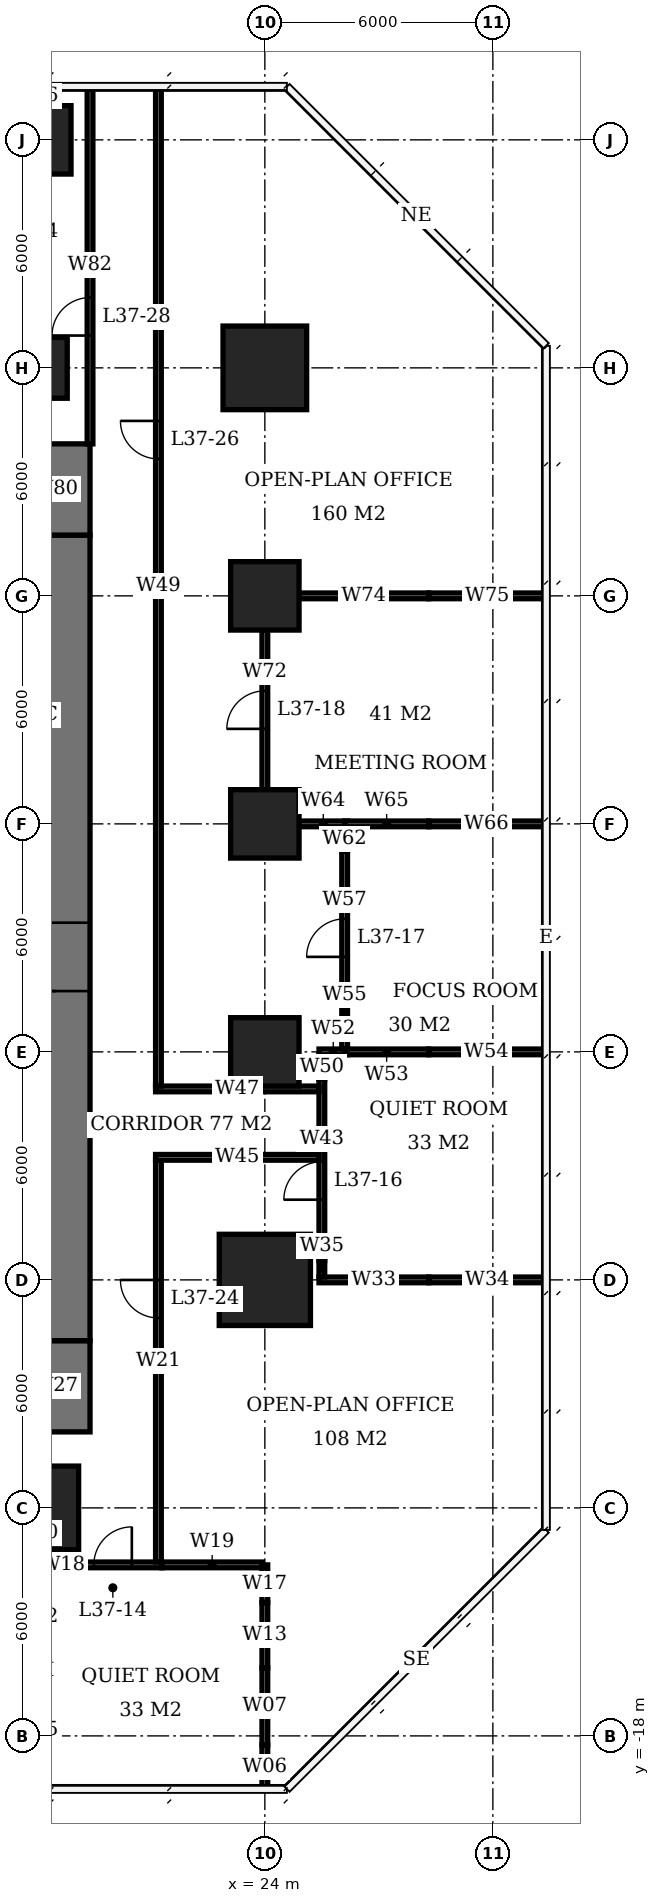
"""IFC4 building model, lengths in metres.
Left out: names, types, materials, properties, quantities, classifications, styles, units other than length and angle.
Written with IfcOpenShell. Run it as: python <this file> out.ifc"""

import sys

from ifc_helpers import new_model, si_unit, direction, frame, frame_2d, origin, origin_2d, place, context, subcontext, project, spatial, rectangle, extrude, element, fill, save


model = new_model("IFC4")
c1 = context("Model", 3, precision=1e-05, world=origin(), true_north=direction((0.0, 1.0)))
c2 = subcontext(c1, "Body", "Model", "MODEL_VIEW")
j1 = project(units=[si_unit("LENGTHUNIT", "METRE"), si_unit("PLANEANGLEUNIT", "RADIAN")], contexts=[c1])
p1 = place(None, origin())
s1 = spatial("IfcSite", under=j1, at=p1, CompositionType="ELEMENT")
p2 = place(p1, origin())
s2 = spatial("IfcBuilding", under=s1, at=p2, CompositionType="ELEMENT")
p3 = place(p2, frame((0.0, 0.0, 152.3)))
s3 = spatial("IfcBuildingStorey", under=s2, at=p3, CompositionType="ELEMENT", Elevation=152.3)
p4 = place(p3, frame((18.0, -12.0, 0.0), z_axis=(0.0, 0.0, 1.0), x_axis=(1.0, 0.0, 0.0)))
e1 = element("IfcColumn", 1, at=p4, inside=s3, PredefinedType="COLUMN", context=c2, shape_type="SweptSolid", body=[
    extrude(rectangle(XDim=2.2, YDim=2.2, at=origin_2d()), origin(), (0.0, 0.0, 1.0), 3.9),
])
p5 = place(p3, frame((18.0, 18.0, 0.0), z_axis=(0.0, 0.0, 1.0), x_axis=(1.0, 0.0, 0.0)))
e2 = element("IfcColumn", 2, at=p5, inside=s3, PredefinedType="COLUMN", context=c2, shape_type="SweptSolid", body=[
    extrude(rectangle(XDim=1.6, YDim=1.6, at=origin_2d()), origin(), (0.0, 0.0, 1.0), 3.9),
])
p6 = place(p3, frame((18.0, 24.0, 0.0), z_axis=(0.0, 0.0, 1.0), x_axis=(1.0, 0.0, 0.0)))
e3 = element("IfcColumn", 3, at=p6, inside=s3, PredefinedType="COLUMN", context=c2, shape_type="SweptSolid", body=[
    extrude(rectangle(XDim=1.8, YDim=1.8, at=origin_2d()), origin(), (0.0, 0.0, 1.0), 3.9),
])
p7 = place(p3, frame((24.0, -6.0, 0.0), z_axis=(0.0, 0.0, 1.0), x_axis=(1.0, 0.0, 0.0)))
e4 = element("IfcColumn", 4, at=p7, inside=s3, PredefinedType="COLUMN", context=c2, shape_type="SweptSolid", body=[
    extrude(rectangle(XDim=2.4, YDim=2.4, at=origin_2d()), origin(), (0.0, 0.0, 1.0), 3.9),
])
for number, where, z_axis, x_axis in (
    (5, (24.0, 0.0, 0.0), (0.0, 0.0, 1.0), (1.0, 0.0, 0.0)),
    (6, (24.0, 6.0, 0.0), (0.0, 0.0, 1.0), (1.0, 0.0, 0.0)),
    (7, (24.0, 12.0, 0.0), (0.0, 0.0, 1.0), (1.0, 0.0, 0.0)),
):
    element("IfcColumn", number, at=place(p3, frame(where, z_axis=z_axis, x_axis=x_axis)), inside=s3, PredefinedType="COLUMN", context=c2, shape_type="SweptSolid", body=[
        extrude(rectangle(XDim=1.8, YDim=1.8, at=origin_2d()), origin(), (0.0, 0.0, 1.0), 3.9),
    ])
p8 = place(p3, frame((24.0, 18.0, 0.0), z_axis=(0.0, 0.0, 1.0), x_axis=(1.0, 0.0, 0.0)))
e8 = element("IfcColumn", 8, at=p8, inside=s3, PredefinedType="COLUMN", context=c2, shape_type="SweptSolid", body=[
    extrude(rectangle(XDim=2.2, YDim=2.2, at=origin_2d()), origin(), (0.0, 0.0, 1.0), 3.9),
])
p9 = place(p3, frame((18.5, -7.6, 0.0), z_axis=(0.0, 0.0, 1.0), x_axis=(0.0, 1.0, 0.0)))
e9 = element("IfcWall", 9, at=p9, inside=s3, PredefinedType="SHEAR", context=c2, shape_type="SweptSolid", body=[
    extrude(rectangle(XDim=21.2, YDim=1.8, at=frame_2d((10.6, 0.0))), origin(), (0.0, 0.0, 1.0), 3.9),
])
p10 = place(p9, frame((9.2, 0.0, 0.0)))
e10 = element("IfcOpeningElement", 10, at=p10, cuts=e9, PredefinedType="OPENING", context=c2, shape_type="SweptSolid", body=[
    extrude(rectangle(XDim=1.8, YDim=2.4, at=frame_2d((0.9, 1.2))), frame((0.0, 0.91, 0.0), z_axis=(0.0, -1.0, 0.0), x_axis=(1.0, 0.0, 0.0)), (0.0, 0.0, 1.0), 1.82),
])
for number, where, z_axis, x_axis in (
    (11, (18.5, -10.0, 0.0), (0.0, 0.0, 1.0), (0.0, 1.0, 0.0)),
    (12, (18.5, 13.6, 0.0), (0.0, 0.0, 1.0), (0.0, 1.0, 0.0)),
):
    element("IfcWall", number, at=place(p3, frame(where, z_axis=z_axis, x_axis=x_axis)), inside=s3, PredefinedType="SHEAR", context=c2, shape_type="SweptSolid", body=[
        extrude(rectangle(XDim=2.4, YDim=1.8, at=frame_2d((1.2, 0.0))), origin(), (0.0, 0.0, 1.0), 3.9),
    ])
p11 = place(p3, frame((18.075, -13.5, 0.0), z_axis=(0.0, 0.0, 1.0), x_axis=(1.0, 0.0, 0.0)))
e13 = element("IfcWall", 13, at=p11, inside=s3, PredefinedType="PARTITIONING", context=c2, shape_type="SweptSolid", body=[
    extrude(rectangle(XDim=3.217, YDim=0.15, at=frame_2d((1.608, 0.0))), origin(), (0.0, 0.0, 1.0), 2.65),
])
p12 = place(p11, frame((1.425, 0.0, 0.0)))
e14 = element("IfcOpeningElement", 14, at=p12, cuts=e13, PredefinedType="OPENING", context=c2, shape_type="SweptSolid", body=[
    extrude(rectangle(XDim=1.0, YDim=2.1, at=frame_2d((0.5, 1.05))), frame((0.0, 0.085, 0.0), z_axis=(0.0, -1.0, 0.0), x_axis=(1.0, 0.0, 0.0)), (0.0, 0.0, 1.0), 0.17),
])
p13 = place(p3, frame((21.292, -13.5, 0.0), z_axis=(0.0, 0.0, 1.0), x_axis=(1.0, 0.0, 0.0)))
e15 = element("IfcWall", 15, at=p13, inside=s3, PredefinedType="PARTITIONING", context=c2, shape_type="SweptSolid", body=[
    extrude(rectangle(XDim=2.643, YDim=0.15, at=frame_2d((1.322, 0.0))), origin(), (0.0, 0.0, 1.0), 3.65),
])
p14 = place(p3, frame((25.425, -6.0, 0.0), z_axis=(0.0, 0.0, 1.0), x_axis=(1.0, 0.0, 0.0)))
e16 = element("IfcWall", 16, at=p14, inside=s3, PredefinedType="PARTITIONING", context=c2, shape_type="SweptSolid", body=[
    extrude(rectangle(XDim=2.885, YDim=0.15, at=frame_2d((1.442, 0.0))), origin(), (0.0, 0.0, 1.0), 2.65),
])
p15 = place(p3, frame((28.31, -6.0, 0.0), z_axis=(0.0, 0.0, 1.0), x_axis=(1.0, 0.0, 0.0)))
e17 = element("IfcWall", 17, at=p15, inside=s3, PredefinedType="PARTITIONING", context=c2, shape_type="SweptSolid", body=[
    extrude(rectangle(XDim=3.09, YDim=0.15, at=frame_2d((1.545, 0.0))), origin(), (0.0, 0.0, 1.0), 3.65),
])
p16 = place(p3, frame((25.425, 0.0, 0.0), z_axis=(0.0, 0.0, 1.0), x_axis=(1.0, 0.0, 0.0)))
e18 = element("IfcWall", 18, at=p16, inside=s3, PredefinedType="PARTITIONING", context=c2, shape_type="SweptSolid", body=[
    extrude(rectangle(XDim=0.75, YDim=0.15, at=frame_2d((0.375, 0.0))), origin(), (0.0, 0.0, 1.0), 2.65),
])
p17 = place(p3, frame((26.1, 0.0, 0.0), z_axis=(0.0, 0.0, 1.0), x_axis=(1.0, 0.0, 0.0)))
e19 = element("IfcWall", 19, at=p17, inside=s3, PredefinedType="PARTITIONING", context=c2, shape_type="SweptSolid", body=[
    extrude(rectangle(XDim=2.21, YDim=0.15, at=frame_2d((1.105, 0.0))), origin(), (0.0, 0.0, 1.0), 2.65),
])
p18 = place(p3, frame((28.31, 0.0, 0.0), z_axis=(0.0, 0.0, 1.0), x_axis=(1.0, 0.0, 0.0)))
e20 = element("IfcWall", 20, at=p18, inside=s3, PredefinedType="PARTITIONING", context=c2, shape_type="SweptSolid", body=[
    extrude(rectangle(XDim=3.04, YDim=0.15, at=frame_2d((1.52, 0.0))), origin(), (0.0, 0.0, 1.0), 3.65),
])
p19 = place(p3, frame((24.9, 6.0, 0.0), z_axis=(0.0, 0.0, 1.0), x_axis=(1.0, 0.0, 0.0)))
e21 = element("IfcWall", 21, at=p19, inside=s3, PredefinedType="PARTITIONING", context=c2, shape_type="SweptSolid", body=[
    extrude(rectangle(XDim=1.275, YDim=0.15, at=frame_2d((0.638, 0.0))), origin(), (0.0, 0.0, 1.0), 2.65),
])
p20 = place(p3, frame((26.1, 6.0, 0.0), z_axis=(0.0, 0.0, 1.0), x_axis=(1.0, 0.0, 0.0)))
e22 = element("IfcWall", 22, at=p20, inside=s3, PredefinedType="PARTITIONING", context=c2, shape_type="SweptSolid", body=[
    extrude(rectangle(XDim=2.21, YDim=0.15, at=frame_2d((1.105, 0.0))), origin(), (0.0, 0.0, 1.0), 2.65),
])
p21 = place(p3, frame((28.31, 6.0, 0.0), z_axis=(0.0, 0.0, 1.0), x_axis=(1.0, 0.0, 0.0)))
e23 = element("IfcWall", 23, at=p21, inside=s3, PredefinedType="PARTITIONING", context=c2, shape_type="SweptSolid", body=[
    extrude(rectangle(XDim=3.04, YDim=0.15, at=frame_2d((1.52, 0.0))), origin(), (0.0, 0.0, 1.0), 3.65),
])
p22 = place(p3, frame((24.9, 12.0, 0.0), z_axis=(0.0, 0.0, 1.0), x_axis=(1.0, 0.0, 0.0)))
e24 = element("IfcWall", 24, at=p22, inside=s3, PredefinedType="PARTITIONING", context=c2, shape_type="SweptSolid", body=[
    extrude(rectangle(XDim=3.41, YDim=0.15, at=frame_2d((1.705, 0.0))), origin(), (0.0, 0.0, 1.0), 2.65),
])
p23 = place(p3, frame((28.31, 12.0, 0.0), z_axis=(0.0, 0.0, 1.0), x_axis=(1.0, 0.0, 0.0)))
e25 = element("IfcWall", 25, at=p23, inside=s3, PredefinedType="PARTITIONING", context=c2, shape_type="SweptSolid", body=[
    extrude(rectangle(XDim=3.09, YDim=0.15, at=frame_2d((1.545, 0.0))), origin(), (0.0, 0.0, 1.0), 3.65),
])
p24 = place(p3, frame((24.0, -19.4, 0.0), z_axis=(0.0, 0.0, 1.0), x_axis=(0.0, 1.0, 0.0)))
e26 = element("IfcWall", 26, at=p24, inside=s3, PredefinedType="PARTITIONING", context=c2, shape_type="SweptSolid", body=[
    extrude(rectangle(XDim=1.163, YDim=0.15, at=frame_2d((0.582, 0.0))), origin(), (0.0, 0.0, 1.0), 3.65),
])
p25 = place(p3, frame((24.0, -18.237, 0.0), z_axis=(0.0, 0.0, 1.0), x_axis=(0.0, 1.0, 0.0)))
e27 = element("IfcWall", 27, at=p25, inside=s3, PredefinedType="PARTITIONING", context=c2, shape_type="SweptSolid", body=[
    extrude(rectangle(XDim=2.029, YDim=0.15, at=frame_2d((1.015, 0.0))), origin(), (0.0, 0.0, 1.0), 2.65),
])
p26 = place(p3, frame((24.0, -16.208, 0.0), z_axis=(0.0, 0.0, 1.0), x_axis=(0.0, 1.0, 0.0)))
e28 = element("IfcWall", 28, at=p26, inside=s3, PredefinedType="PARTITIONING", context=c2, shape_type="SweptSolid", body=[
    extrude(rectangle(XDim=1.718, YDim=0.15, at=frame_2d((0.859, 0.0))), origin(), (0.0, 0.0, 1.0), 3.65),
])
p27 = place(p3, frame((24.0, -14.49, 0.0), z_axis=(0.0, 0.0, 1.0), x_axis=(0.0, 1.0, 0.0)))
e29 = element("IfcWall", 29, at=p27, inside=s3, PredefinedType="PARTITIONING", context=c2, shape_type="SweptSolid", body=[
    extrude(rectangle(XDim=0.99, YDim=0.15, at=frame_2d((0.495, 0.0))), origin(), (0.0, 0.0, 1.0), 2.65),
])
p28 = place(p3, frame((24.0, 6.9, 0.0), z_axis=(0.0, 0.0, 1.0), x_axis=(0.0, 1.0, 0.0)))
e30 = element("IfcWall", 30, at=p28, inside=s3, PredefinedType="PARTITIONING", context=c2, shape_type="SweptSolid", body=[
    extrude(rectangle(XDim=4.2, YDim=0.15, at=frame_2d((2.1, 0.0))), origin(), (0.0, 0.0, 1.0), 3.65),
])
p29 = place(p28, frame((1.6, 0.0, 0.0)))
e31 = element("IfcOpeningElement", 31, at=p29, cuts=e30, PredefinedType="OPENING", context=c2, shape_type="SweptSolid", body=[
    extrude(rectangle(XDim=1.0, YDim=2.1, at=frame_2d((0.5, 1.05))), frame((0.0, 0.085, 0.0), z_axis=(0.0, -1.0, 0.0), x_axis=(1.0, 0.0, 0.0)), (0.0, 0.0, 1.0), 0.17),
])
p30 = place(p3, frame((25.5, -5.925, 0.0), z_axis=(0.0, 0.0, 1.0), x_axis=(0.0, 1.0, 0.0)))
e32 = element("IfcWall", 32, at=p30, inside=s3, PredefinedType="PARTITIONING", context=c2, shape_type="SweptSolid", body=[
    extrude(rectangle(XDim=0.435, YDim=0.15, at=frame_2d((0.218, 0.0))), origin(), (0.0, 0.0, 1.0), 2.65),
])
p31 = place(p3, frame((25.5, -5.49, 0.0), z_axis=(0.0, 0.0, 1.0), x_axis=(0.0, 1.0, 0.0)))
e33 = element("IfcWall", 33, at=p31, inside=s3, PredefinedType="PARTITIONING", context=c2, shape_type="SweptSolid", body=[
    extrude(rectangle(XDim=4.78, YDim=0.15, at=frame_2d((2.39, 0.0))), origin(), (0.0, 0.0, 1.0), 3.65),
])
p32 = place(p31, frame((1.6, 0.0, 0.0)))
e34 = element("IfcOpeningElement", 34, at=p32, cuts=e33, PredefinedType="OPENING", context=c2, shape_type="SweptSolid", body=[
    extrude(rectangle(XDim=1.0, YDim=2.1, at=frame_2d((0.5, 1.05))), frame((0.0, 0.085, 0.0), z_axis=(0.0, -1.0, 0.0), x_axis=(1.0, 0.0, 0.0)), (0.0, 0.0, 1.0), 0.17),
])
for number, where, z_axis, x_axis in (
    (35, (25.5, -0.71, 0.0), (0.0, 0.0, 1.0), (0.0, 1.0, 0.0)),
    (36, (26.1, 0.075, 0.0), (0.0, 0.0, 1.0), (0.0, 1.0, 0.0)),
):
    element("IfcWall", number, at=place(p3, frame(where, z_axis=z_axis, x_axis=x_axis)), inside=s3, PredefinedType="PARTITIONING", context=c2, shape_type="SweptSolid", body=[
        extrude(rectangle(XDim=0.635, YDim=0.15, at=frame_2d((0.317, 0.0))), origin(), (0.0, 0.0, 1.0), 2.65),
    ])
p33 = place(p3, frame((26.1, 0.71, 0.0), z_axis=(0.0, 0.0, 1.0), x_axis=(0.0, 1.0, 0.0)))
e37 = element("IfcWall", 37, at=p33, inside=s3, PredefinedType="PARTITIONING", context=c2, shape_type="SweptSolid", body=[
    extrude(rectangle(XDim=4.58, YDim=0.15, at=frame_2d((2.29, 0.0))), origin(), (0.0, 0.0, 1.0), 3.65),
])
p34 = place(p33, frame((1.79, 0.0, 0.0)))
e38 = element("IfcOpeningElement", 38, at=p34, cuts=e37, PredefinedType="OPENING", context=c2, shape_type="SweptSolid", body=[
    extrude(rectangle(XDim=1.0, YDim=2.1, at=frame_2d((0.5, 1.05))), frame((0.0, 0.085, 0.0), z_axis=(0.0, -1.0, 0.0), x_axis=(1.0, 0.0, 0.0)), (0.0, 0.0, 1.0), 0.17),
])
p35 = place(p3, frame((26.1, 5.29, 0.0), z_axis=(0.0, 0.0, 1.0), x_axis=(0.0, 1.0, 0.0)))
e39 = element("IfcWall", 39, at=p35, inside=s3, PredefinedType="PARTITIONING", context=c2, shape_type="SweptSolid", body=[
    extrude(rectangle(XDim=0.635, YDim=0.15, at=frame_2d((0.317, 0.0))), origin(), (0.0, 0.0, 1.0), 2.65),
])
p36 = place(p3, frame((19.4, 16.0, 0.0), z_axis=(0.0, 0.0, 1.0), x_axis=(0.0, 1.0, 0.0)))
e40 = element("IfcWall", 40, at=p36, inside=s3, PredefinedType="PARTITIONING", context=c2, shape_type="SweptSolid", body=[
    extrude(rectangle(XDim=9.4, YDim=0.15, at=frame_2d((4.7, 0.0))), origin(), (0.0, 0.0, 1.0), 3.65),
])
p37 = place(p36, frame((2.85, 0.0, 0.0)))
e41 = element("IfcOpeningElement", 41, at=p37, cuts=e40, PredefinedType="OPENING", context=c2, shape_type="SweptSolid", body=[
    extrude(rectangle(XDim=1.0, YDim=2.1, at=frame_2d((0.5, 1.05))), frame((0.0, 0.085, 0.0), z_axis=(0.0, -1.0, 0.0), x_axis=(1.0, 0.0, 0.0)), (0.0, 0.0, 1.0), 0.17),
])
p38 = place(p3, frame((21.2, -13.425, 0.0), z_axis=(0.0, 0.0, 1.0), x_axis=(0.0, 1.0, 0.0)))
e42 = element("IfcWall", 42, at=p38, inside=s3, PredefinedType="PARTITIONING", context=c2, shape_type="SweptSolid", body=[
    extrude(rectangle(XDim=10.575, YDim=0.15, at=frame_2d((5.288, 0.0))), origin(), (0.0, 0.0, 1.0), 3.65),
])
p39 = place(p38, frame((6.423, 0.0, 0.0)))
e43 = element("IfcOpeningElement", 43, at=p39, cuts=e42, PredefinedType="OPENING", context=c2, shape_type="SweptSolid", body=[
    extrude(rectangle(XDim=1.0, YDim=2.1, at=frame_2d((0.5, 1.05))), frame((0.0, 0.085, 0.0), z_axis=(0.0, -1.0, 0.0), x_axis=(1.0, 0.0, 0.0)), (0.0, 0.0, 1.0), 0.17),
])
p40 = place(p3, frame((21.125, -2.775, 0.0), z_axis=(0.0, 0.0, 1.0), x_axis=(1.0, 0.0, 0.0)))
e44 = element("IfcWall", 44, at=p40, inside=s3, PredefinedType="PARTITIONING", context=c2, shape_type="SweptSolid", body=[
    extrude(rectangle(XDim=4.3, YDim=0.15, at=frame_2d((2.15, 0.0))), origin(), (0.0, 0.0, 1.0), 3.65),
])
p41 = place(p3, frame((21.2, -0.9, 0.0), z_axis=(0.0, 0.0, 1.0), x_axis=(0.0, 1.0, 0.0)))
e45 = element("IfcWall", 45, at=p41, inside=s3, PredefinedType="PARTITIONING", context=c2, shape_type="SweptSolid", body=[
    extrude(rectangle(XDim=26.3, YDim=0.15, at=frame_2d((13.15, 0.0))), origin(), (0.0, 0.0, 1.0), 3.65),
])
p42 = place(p41, frame((16.504, 0.0, 0.0)))
e46 = element("IfcOpeningElement", 46, at=p42, cuts=e45, PredefinedType="OPENING", context=c2, shape_type="SweptSolid", body=[
    extrude(rectangle(XDim=1.0, YDim=2.1, at=frame_2d((0.5, 1.05))), frame((0.0, 0.085, 0.0), z_axis=(0.0, -1.0, 0.0), x_axis=(1.0, 0.0, 0.0)), (0.0, 0.0, 1.0), 0.17),
])
p43 = place(p3, frame((21.125, -0.975, 0.0), z_axis=(0.0, 0.0, 1.0), x_axis=(1.0, 0.0, 0.0)))
e47 = element("IfcWall", 47, at=p43, inside=s3, PredefinedType="PARTITIONING", context=c2, shape_type="SweptSolid", body=[
    extrude(rectangle(XDim=4.3, YDim=0.15, at=frame_2d((2.15, 0.0))), origin(), (0.0, 0.0, 1.0), 3.65),
])
p44 = place(p10, origin())
e48 = element("IfcDoor", 48, at=p44, inside=s3, OperationType="DOUBLE_DOOR_SINGLE_SWING", PredefinedType="DOOR", context=c2, shape_type="SweptSolid", body=[
    extrude(rectangle(XDim=1.8, YDim=2.4, at=frame_2d((0.9, 1.2))), frame((0.0, 0.025, 0.0), z_axis=(0.0, -1.0, 0.0), x_axis=(1.0, 0.0, 0.0)), (0.0, 0.0, 1.0), 0.05),
])
fill(e10, e48)
p45 = place(p12, origin())
e49 = element("IfcDoor", 49, at=p45, inside=s3, OperationType="SINGLE_SWING_RIGHT", PredefinedType="DOOR", context=c2, shape_type="SweptSolid", body=[
    extrude(rectangle(XDim=1.0, YDim=2.1, at=frame_2d((0.5, 1.05))), frame((0.0, 0.025, 0.0), z_axis=(0.0, -1.0, 0.0), x_axis=(1.0, 0.0, 0.0)), (0.0, 0.0, 1.0), 0.05),
])
fill(e14, e49)
p46 = place(p32, origin())
e50 = element("IfcDoor", 50, at=p46, inside=s3, OperationType="SINGLE_SWING_LEFT", PredefinedType="DOOR", context=c2, shape_type="SweptSolid", body=[
    extrude(rectangle(XDim=1.0, YDim=2.1, at=frame_2d((0.5, 1.05))), frame((0.0, 0.025, 0.0), z_axis=(0.0, -1.0, 0.0), x_axis=(1.0, 0.0, 0.0)), (0.0, 0.0, 1.0), 0.05),
])
fill(e34, e50)
p47 = place(p34, origin())
e51 = element("IfcDoor", 51, at=p47, inside=s3, OperationType="SINGLE_SWING_LEFT", PredefinedType="DOOR", context=c2, shape_type="SweptSolid", body=[
    extrude(rectangle(XDim=1.0, YDim=2.1, at=frame_2d((0.5, 1.05))), frame((0.0, 0.025, 0.0), z_axis=(0.0, -1.0, 0.0), x_axis=(1.0, 0.0, 0.0)), (0.0, 0.0, 1.0), 0.05),
])
fill(e38, e51)
p48 = place(p29, origin())
e52 = element("IfcDoor", 52, at=p48, inside=s3, OperationType="SINGLE_SWING_LEFT", PredefinedType="DOOR", context=c2, shape_type="SweptSolid", body=[
    extrude(rectangle(XDim=1.0, YDim=2.1, at=frame_2d((0.5, 1.05))), frame((0.0, 0.025, 0.0), z_axis=(0.0, -1.0, 0.0), x_axis=(1.0, 0.0, 0.0)), (0.0, 0.0, 1.0), 0.05),
])
fill(e31, e52)
p49 = place(p39, origin())
e53 = element("IfcDoor", 53, at=p49, inside=s3, OperationType="SINGLE_SWING_RIGHT", PredefinedType="DOOR", context=c2, shape_type="SweptSolid", body=[
    extrude(rectangle(XDim=1.0, YDim=2.1, at=frame_2d((0.5, 1.05))), frame((0.0, 0.025, 0.0), z_axis=(0.0, -1.0, 0.0), x_axis=(1.0, 0.0, 0.0)), (0.0, 0.0, 1.0), 0.05),
])
fill(e43, e53)
p50 = place(p42, origin())
e54 = element("IfcDoor", 54, at=p50, inside=s3, OperationType="SINGLE_SWING_RIGHT", PredefinedType="DOOR", context=c2, shape_type="SweptSolid", body=[
    extrude(rectangle(XDim=1.0, YDim=2.1, at=frame_2d((0.5, 1.05))), frame((0.0, 0.025, 0.0), z_axis=(0.0, -1.0, 0.0), x_axis=(1.0, 0.0, 0.0)), (0.0, 0.0, 1.0), 0.05),
])
fill(e46, e54)
p51 = place(p37, origin())
e55 = element("IfcDoor", 55, at=p51, inside=s3, OperationType="SINGLE_SWING_LEFT", PredefinedType="DOOR", context=c2, shape_type="SweptSolid", body=[
    extrude(rectangle(XDim=1.0, YDim=2.1, at=frame_2d((0.5, 1.05))), frame((0.0, 0.025, 0.0), z_axis=(0.0, -1.0, 0.0), x_axis=(1.0, 0.0, 0.0)), (0.0, 0.0, 1.0), 0.05),
])
fill(e41, e55)
save(model, sys.argv[1])
